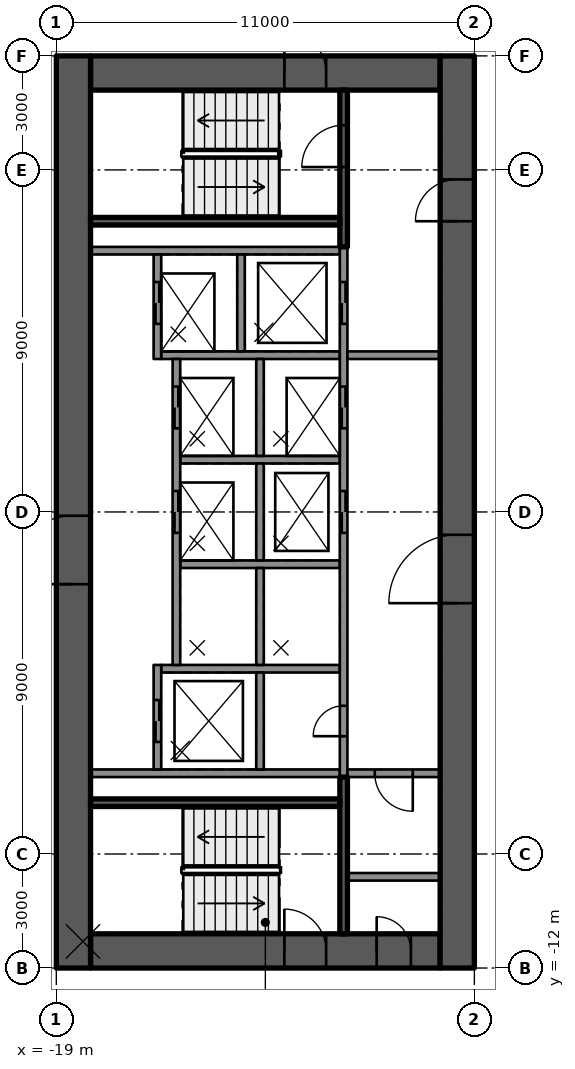
"""IFC4 building model, lengths in metres.
Left out: names, types, materials, properties, quantities, classifications, styles, units other than length and angle.
Written with IfcOpenShell. Run it as: python <this file> out.ifc"""

import sys

from ifc_helpers import new_model, si_unit, direction, frame, frame_2d, origin, place, context, subcontext, project, spatial, rectangle, extrude, element, fill, save


model = new_model("IFC4")
c1 = context("Model", 3, precision=1e-05, world=origin(), true_north=direction((0.0, 1.0)))
c2 = subcontext(c1, "Body", "Model", "MODEL_VIEW")
j1 = project(units=[si_unit("LENGTHUNIT", "METRE"), si_unit("PLANEANGLEUNIT", "RADIAN")], contexts=[c1])
p1 = place(None, origin())
s1 = spatial("IfcSite", under=j1, at=p1, CompositionType="ELEMENT")
p2 = place(p1, origin())
s2 = spatial("IfcBuilding", under=s1, at=p2, CompositionType="ELEMENT")
p3 = place(p2, frame((0.0, 0.0, 116.2)))
s3 = spatial("IfcBuildingStorey", under=s2, at=p3, CompositionType="ELEMENT", Elevation=116.2)
p4 = place(p3, frame((-18.1, 11.55, 0.0), z_axis=(0.0, 0.0, 1.0), x_axis=(1.0, 0.0, 0.0)))
e1 = element("IfcWall", 1, at=p4, inside=s3, PredefinedType="SHEAR", context=c2, shape_type="SweptSolid", body=[
    extrude(rectangle(XDim=9.2, YDim=0.9, at=frame_2d((4.6, 0.0))), origin(), (0.0, 0.0, 1.0), 3.5),
])
p5 = place(p4, frame((5.1, 0.0, 0.0)))
e2 = element("IfcOpeningElement", 2, at=p5, cuts=e1, PredefinedType="OPENING", context=c2, shape_type="SweptSolid", body=[
    extrude(rectangle(XDim=1.1, YDim=2.1, at=frame_2d((0.55, 1.05))), frame((0.0, 0.46, 0.0), z_axis=(0.0, -1.0, 0.0), x_axis=(1.0, 0.0, 0.0)), (0.0, 0.0, 1.0), 0.92),
])
p6 = place(p3, frame((-18.1, -11.55, 0.0), z_axis=(0.0, 0.0, 1.0), x_axis=(1.0, 0.0, 0.0)))
e3 = element("IfcWall", 3, at=p6, inside=s3, PredefinedType="SHEAR", context=c2, shape_type="SweptSolid", body=[
    extrude(rectangle(XDim=9.2, YDim=0.9, at=frame_2d((4.6, 0.0))), origin(), (0.0, 0.0, 1.0), 3.5),
])
p7 = place(p6, frame((5.1, 0.0, 0.0)))
e4 = element("IfcOpeningElement", 4, at=p7, cuts=e3, PredefinedType="OPENING", context=c2, shape_type="SweptSolid", body=[
    extrude(rectangle(XDim=1.1, YDim=2.1, at=frame_2d((0.55, 1.05))), frame((0.0, 0.46, 0.0), z_axis=(0.0, -1.0, 0.0), x_axis=(1.0, 0.0, 0.0)), (0.0, 0.0, 1.0), 0.92),
])
p8 = place(p6, frame((7.53, 0.0, 0.0)))
e5 = element("IfcOpeningElement", 5, at=p8, cuts=e3, PredefinedType="OPENING", context=c2, shape_type="SweptSolid", body=[
    extrude(rectangle(XDim=0.9, YDim=2.1, at=frame_2d((0.45, 1.05))), frame((0.0, 0.46, 0.0), z_axis=(0.0, -1.0, 0.0), x_axis=(1.0, 0.0, 0.0)), (0.0, 0.0, 1.0), 0.92),
])
p9 = place(p3, frame((-18.55, -12.0, 0.0), z_axis=(0.0, 0.0, 1.0), x_axis=(0.0, 1.0, 0.0)))
e6 = element("IfcWall", 6, at=p9, inside=s3, PredefinedType="SHEAR", context=c2, shape_type="SweptSolid", body=[
    extrude(rectangle(XDim=24.0, YDim=0.9, at=frame_2d((12.0, 0.0))), origin(), (0.0, 0.0, 1.0), 3.5),
])
p10 = place(p9, frame((10.1, 0.0, 0.0)))
e7 = element("IfcOpeningElement", 7, at=p10, cuts=e6, PredefinedType="OPENING", context=c2, shape_type="SweptSolid", body=[
    extrude(rectangle(XDim=1.8, YDim=2.1, at=frame_2d((0.9, 1.05))), frame((0.0, 0.46, 0.0), z_axis=(0.0, -1.0, 0.0), x_axis=(1.0, 0.0, 0.0)), (0.0, 0.0, 1.0), 0.92),
])
p11 = place(p3, frame((-8.45, -12.0, 0.0), z_axis=(0.0, 0.0, 1.0), x_axis=(0.0, 1.0, 0.0)))
e8 = element("IfcWall", 8, at=p11, inside=s3, PredefinedType="SHEAR", context=c2, shape_type="SweptSolid", body=[
    extrude(rectangle(XDim=24.0, YDim=0.9, at=frame_2d((12.0, 0.0))), origin(), (0.0, 0.0, 1.0), 3.5),
])
p12 = place(p11, frame((9.6, 0.0, 0.0)))
e9 = element("IfcOpeningElement", 9, at=p12, cuts=e8, PredefinedType="OPENING", context=c2, shape_type="SweptSolid", body=[
    extrude(rectangle(XDim=1.8, YDim=2.1, at=frame_2d((0.9, 1.05))), frame((0.0, 0.46, 0.0), z_axis=(0.0, -1.0, 0.0), x_axis=(1.0, 0.0, 0.0)), (0.0, 0.0, 1.0), 0.92),
])
p13 = place(p11, frame((19.65, 0.0, 0.0)))
e10 = element("IfcOpeningElement", 10, at=p13, cuts=e8, PredefinedType="OPENING", context=c2, shape_type="SweptSolid", body=[
    extrude(rectangle(XDim=1.1, YDim=2.1, at=frame_2d((0.55, 1.05))), frame((0.0, 0.46, 0.0), z_axis=(0.0, -1.0, 0.0), x_axis=(1.0, 0.0, 0.0)), (0.0, 0.0, 1.0), 0.92),
])
for number, where, z_axis, x_axis in (
    (11, (-11.54, 6.875, 0.0), (0.0, 0.0, 1.0), (-1.0, 0.0, 0.0)),
    (12, (-11.54, -6.875, 0.0), (0.0, 0.0, 1.0), (-1.0, 0.0, 0.0)),
):
    element("IfcWall", number, at=place(p3, frame(where, z_axis=z_axis, x_axis=x_axis)), inside=s3, PredefinedType="SOLIDWALL", context=c2, shape_type="SweptSolid", body=[
        extrude(rectangle(XDim=6.56, YDim=0.2, at=frame_2d((3.28, 0.0))), origin(), (0.0, 0.0, 1.0), 3.09),
    ])
p14 = place(p3, frame((-11.54, -4.125, 0.0), z_axis=(0.0, 0.0, 1.0), x_axis=(-1.0, 0.0, 0.0)))
e13 = element("IfcWall", 13, at=p14, inside=s3, PredefinedType="SOLIDWALL", context=c2, shape_type="SweptSolid", body=[
    extrude(rectangle(XDim=4.7, YDim=0.2, at=frame_2d((2.35, 0.0))), origin(), (0.0, 0.0, 1.0), 3.09),
])
for number, where, z_axis, x_axis in (
    (14, (-11.54, -1.375, 0.0), (0.0, 0.0, 1.0), (-1.0, 0.0, 0.0)),
    (15, (-11.54, 1.375, 0.0), (0.0, 0.0, 1.0), (-1.0, 0.0, 0.0)),
):
    element("IfcWall", number, at=place(p3, frame(where, z_axis=z_axis, x_axis=x_axis)), inside=s3, PredefinedType="SOLIDWALL", context=c2, shape_type="SweptSolid", body=[
        extrude(rectangle(XDim=4.2, YDim=0.2, at=frame_2d((2.1, 0.0))), origin(), (0.0, 0.0, 1.0), 3.09),
    ])
p15 = place(p3, frame((-11.54, 4.125, 0.0), z_axis=(0.0, 0.0, 1.0), x_axis=(-1.0, 0.0, 0.0)))
e16 = element("IfcWall", 16, at=p15, inside=s3, PredefinedType="SOLIDWALL", context=c2, shape_type="SweptSolid", body=[
    extrude(rectangle(XDim=4.7, YDim=0.2, at=frame_2d((2.35, 0.0))), origin(), (0.0, 0.0, 1.0), 3.09),
])
p16 = place(p3, frame((-11.44, -6.975, 0.0), z_axis=(0.0, 0.0, 1.0), x_axis=(0.0, 1.0, 0.0)))
e17 = element("IfcWall", 17, at=p16, inside=s3, PredefinedType="SOLIDWALL", context=c2, shape_type="SweptSolid", body=[
    extrude(rectangle(XDim=13.95, YDim=0.2, at=frame_2d((6.975, 0.0))), origin(), (0.0, 0.0, 1.0), 3.09),
])
p17 = place(p16, frame((6.425, 0.0, 0.0)))
e18 = element("IfcOpeningElement", 18, at=p17, cuts=e17, PredefinedType="OPENING", context=c2, shape_type="SweptSolid", body=[
    extrude(rectangle(XDim=1.1, YDim=2.1, at=frame_2d((0.55, 1.05))), frame((0.0, 0.11, 0.0), z_axis=(0.0, -1.0, 0.0), x_axis=(1.0, 0.0, 0.0)), (0.0, 0.0, 1.0), 0.22),
])
p18 = place(p16, frame((9.175, 0.0, 0.0)))
e19 = element("IfcOpeningElement", 19, at=p18, cuts=e17, PredefinedType="OPENING", context=c2, shape_type="SweptSolid", body=[
    extrude(rectangle(XDim=1.1, YDim=2.1, at=frame_2d((0.55, 1.05))), frame((0.0, 0.11, 0.0), z_axis=(0.0, -1.0, 0.0), x_axis=(1.0, 0.0, 0.0)), (0.0, 0.0, 1.0), 0.22),
])
p19 = place(p16, frame((11.925, 0.0, 0.0)))
e20 = element("IfcOpeningElement", 20, at=p19, cuts=e17, PredefinedType="OPENING", context=c2, shape_type="SweptSolid", body=[
    extrude(rectangle(XDim=1.1, YDim=2.1, at=frame_2d((0.55, 1.05))), frame((0.0, 0.11, 0.0), z_axis=(0.0, -1.0, 0.0), x_axis=(1.0, 0.0, 0.0)), (0.0, 0.0, 1.0), 0.22),
])
p20 = place(p16, frame((1.075, 0.0, 0.0)))
e21 = element("IfcOpeningElement", 21, at=p20, cuts=e17, PredefinedType="OPENING", context=c2, shape_type="SweptSolid", body=[
    extrude(rectangle(XDim=0.8, YDim=2.1, at=frame_2d((0.4, 1.05))), frame((0.0, 0.11, 0.0), z_axis=(0.0, -1.0, 0.0), x_axis=(1.0, 0.0, 0.0)), (0.0, 0.0, 1.0), 0.22),
])
for number, where, z_axis, x_axis in (
    (22, (-13.64, -6.775, 0.0), (0.0, 0.0, 1.0), (0.0, 1.0, 0.0)),
    (23, (-13.64, -4.025, 0.0), (0.0, 0.0, 1.0), (0.0, 1.0, 0.0)),
    (24, (-13.64, -1.275, 0.0), (0.0, 0.0, 1.0), (0.0, 1.0, 0.0)),
    (25, (-13.64, 1.475, 0.0), (0.0, 0.0, 1.0), (0.0, 1.0, 0.0)),
    (26, (-14.14, 4.225, 0.0), (0.0, 0.0, 1.0), (0.0, 1.0, 0.0)),
):
    element("IfcWall", number, at=place(p3, frame(where, z_axis=z_axis, x_axis=x_axis)), inside=s3, PredefinedType="SOLIDWALL", context=c2, shape_type="SweptSolid", body=[
        extrude(rectangle(XDim=2.55, YDim=0.2, at=frame_2d((1.275, 0.0))), origin(), (0.0, 0.0, 1.0), 3.09),
    ])
p21 = place(p3, frame((-16.34, -6.775, 0.0), z_axis=(0.0, 0.0, 1.0), x_axis=(0.0, 1.0, 0.0)))
e27 = element("IfcWall", 27, at=p21, inside=s3, PredefinedType="SOLIDWALL", context=c2, shape_type="SweptSolid", body=[
    extrude(rectangle(XDim=2.75, YDim=0.2, at=frame_2d((1.375, 0.0))), origin(), (0.0, 0.0, 1.0), 3.09),
])
p22 = place(p21, frame((0.725, 0.0, 0.0)))
e28 = element("IfcOpeningElement", 28, at=p22, cuts=e27, PredefinedType="OPENING", context=c2, shape_type="SweptSolid", body=[
    extrude(rectangle(XDim=1.1, YDim=2.1, at=frame_2d((0.55, 1.05))), frame((0.0, 0.11, 0.0), z_axis=(0.0, -1.0, 0.0), x_axis=(1.0, 0.0, 0.0)), (0.0, 0.0, 1.0), 0.22),
])
p23 = place(p3, frame((-15.84, -4.025, 0.0), z_axis=(0.0, 0.0, 1.0), x_axis=(0.0, 1.0, 0.0)))
e29 = element("IfcWall", 29, at=p23, inside=s3, PredefinedType="SOLIDWALL", context=c2, shape_type="SweptSolid", body=[
    extrude(rectangle(XDim=8.05, YDim=0.2, at=frame_2d((4.025, 0.0))), origin(), (0.0, 0.0, 1.0), 3.09),
])
p24 = place(p23, frame((3.475, 0.0, 0.0)))
e30 = element("IfcOpeningElement", 30, at=p24, cuts=e29, PredefinedType="OPENING", context=c2, shape_type="SweptSolid", body=[
    extrude(rectangle(XDim=1.1, YDim=2.1, at=frame_2d((0.55, 1.05))), frame((0.0, 0.11, 0.0), z_axis=(0.0, -1.0, 0.0), x_axis=(1.0, 0.0, 0.0)), (0.0, 0.0, 1.0), 0.22),
])
p25 = place(p23, frame((6.225, 0.0, 0.0)))
e31 = element("IfcOpeningElement", 31, at=p25, cuts=e29, PredefinedType="OPENING", context=c2, shape_type="SweptSolid", body=[
    extrude(rectangle(XDim=1.1, YDim=2.1, at=frame_2d((0.55, 1.05))), frame((0.0, 0.11, 0.0), z_axis=(0.0, -1.0, 0.0), x_axis=(1.0, 0.0, 0.0)), (0.0, 0.0, 1.0), 0.22),
])
p26 = place(p3, frame((-16.34, 4.025, 0.0), z_axis=(0.0, 0.0, 1.0), x_axis=(0.0, 1.0, 0.0)))
e32 = element("IfcWall", 32, at=p26, inside=s3, PredefinedType="SOLIDWALL", context=c2, shape_type="SweptSolid", body=[
    extrude(rectangle(XDim=2.75, YDim=0.2, at=frame_2d((1.375, 0.0))), origin(), (0.0, 0.0, 1.0), 3.09),
])
p27 = place(p26, frame((0.925, 0.0, 0.0)))
e33 = element("IfcOpeningElement", 33, at=p27, cuts=e32, PredefinedType="OPENING", context=c2, shape_type="SweptSolid", body=[
    extrude(rectangle(XDim=1.1, YDim=2.1, at=frame_2d((0.55, 1.05))), frame((0.0, 0.11, 0.0), z_axis=(0.0, -1.0, 0.0), x_axis=(1.0, 0.0, 0.0)), (0.0, 0.0, 1.0), 0.22),
])
p28 = place(p3, frame((-11.44, 6.975, 0.0), z_axis=(0.0, 0.0, 1.0), x_axis=(0.0, 1.0, 0.0)))
e34 = element("IfcWall", 34, at=p28, inside=s3, PredefinedType="SOLIDWALL", context=c2, shape_type="SweptSolid", body=[
    extrude(rectangle(XDim=4.125, YDim=0.2, at=frame_2d((2.062, 0.0))), origin(), (0.0, 0.0, 1.0), 3.09),
])
p29 = place(p28, frame((2.1, 0.0, 0.0)))
e35 = element("IfcOpeningElement", 35, at=p29, cuts=e34, PredefinedType="OPENING", context=c2, shape_type="SweptSolid", body=[
    extrude(rectangle(XDim=1.1, YDim=2.1, at=frame_2d((0.55, 1.05))), frame((0.0, 0.11, 0.0), z_axis=(0.0, -1.0, 0.0), x_axis=(1.0, 0.0, 0.0)), (0.0, 0.0, 1.0), 0.22),
])
p30 = place(p3, frame((-11.54, 7.65, 0.0), z_axis=(0.0, 0.0, 1.0), x_axis=(-1.0, 0.0, 0.0)))
e36 = element("IfcWall", 36, at=p30, inside=s3, PredefinedType="SOLIDWALL", context=c2, shape_type="SweptSolid", body=[
    extrude(rectangle(XDim=6.56, YDim=0.2, at=frame_2d((3.28, 0.0))), origin(), (0.0, 0.0, 1.0), 3.09),
])
p31 = place(p3, frame((-11.44, -11.1, 0.0), z_axis=(0.0, 0.0, 1.0), x_axis=(0.0, 1.0, 0.0)))
e37 = element("IfcWall", 37, at=p31, inside=s3, PredefinedType="SOLIDWALL", context=c2, shape_type="SweptSolid", body=[
    extrude(rectangle(XDim=4.125, YDim=0.2, at=frame_2d((2.062, 0.0))), origin(), (0.0, 0.0, 1.0), 3.09),
])
p32 = place(p3, frame((-11.54, -7.65, 0.0), z_axis=(0.0, 0.0, 1.0), x_axis=(-1.0, 0.0, 0.0)))
e38 = element("IfcWall", 38, at=p32, inside=s3, PredefinedType="SOLIDWALL", context=c2, shape_type="SweptSolid", body=[
    extrude(rectangle(XDim=6.56, YDim=0.2, at=frame_2d((3.28, 0.0))), origin(), (0.0, 0.0, 1.0), 3.09),
])
p33 = place(p3, frame((-8.9, 4.125, 0.0), z_axis=(0.0, 0.0, 1.0), x_axis=(-1.0, 0.0, 0.0)))
e39 = element("IfcWall", 39, at=p33, inside=s3, PredefinedType="PARTITIONING", context=c2, shape_type="SweptSolid", body=[
    extrude(rectangle(XDim=2.44, YDim=0.2, at=frame_2d((1.22, 0.0))), origin(), (0.0, 0.0, 1.0), 3.09),
])
p34 = place(p3, frame((-8.9, -6.875, 0.0), z_axis=(0.0, 0.0, 1.0), x_axis=(-1.0, 0.0, 0.0)))
e40 = element("IfcWall", 40, at=p34, inside=s3, PredefinedType="PARTITIONING", context=c2, shape_type="SweptSolid", body=[
    extrude(rectangle(XDim=2.44, YDim=0.2, at=frame_2d((1.22, 0.0))), origin(), (0.0, 0.0, 1.0), 3.09),
])
p35 = place(p34, frame((0.72, 0.0, 0.0)))
e41 = element("IfcOpeningElement", 41, at=p35, cuts=e40, PredefinedType="OPENING", context=c2, shape_type="SweptSolid", body=[
    extrude(rectangle(XDim=1.0, YDim=2.1, at=frame_2d((0.5, 1.05))), frame((0.0, 0.11, 0.0), z_axis=(0.0, -1.0, 0.0), x_axis=(1.0, 0.0, 0.0)), (0.0, 0.0, 1.0), 0.22),
])
p36 = place(p3, frame((-8.9, -9.6, 0.0), z_axis=(0.0, 0.0, 1.0), x_axis=(-1.0, 0.0, 0.0)))
e42 = element("IfcWall", 42, at=p36, inside=s3, PredefinedType="PARTITIONING", context=c2, shape_type="SweptSolid", body=[
    extrude(rectangle(XDim=2.44, YDim=0.2, at=frame_2d((1.22, 0.0))), origin(), (0.0, 0.0, 1.0), 3.09),
])
p37 = place(p22, origin())
e43 = element("IfcDoor", 43, at=p37, inside=s3, OperationType="DOUBLE_DOOR_SLIDING", PredefinedType="DOOR", context=c2, shape_type="SweptSolid", body=[
    extrude(rectangle(XDim=1.1, YDim=2.1, at=frame_2d((0.55, 1.05))), frame((0.0, 0.025, 0.0), z_axis=(0.0, -1.0, 0.0), x_axis=(1.0, 0.0, 0.0)), (0.0, 0.0, 1.0), 0.05),
])
fill(e28, e43)
p38 = place(p17, origin())
e44 = element("IfcDoor", 44, at=p38, inside=s3, OperationType="DOUBLE_DOOR_SLIDING", PredefinedType="DOOR", context=c2, shape_type="SweptSolid", body=[
    extrude(rectangle(XDim=1.1, YDim=2.1, at=frame_2d((0.55, 1.05))), frame((0.0, 0.025, 0.0), z_axis=(0.0, -1.0, 0.0), x_axis=(1.0, 0.0, 0.0)), (0.0, 0.0, 1.0), 0.05),
])
fill(e18, e44)
p39 = place(p24, origin())
e45 = element("IfcDoor", 45, at=p39, inside=s3, OperationType="DOUBLE_DOOR_SLIDING", PredefinedType="DOOR", context=c2, shape_type="SweptSolid", body=[
    extrude(rectangle(XDim=1.1, YDim=2.1, at=frame_2d((0.55, 1.05))), frame((0.0, 0.025, 0.0), z_axis=(0.0, -1.0, 0.0), x_axis=(1.0, 0.0, 0.0)), (0.0, 0.0, 1.0), 0.05),
])
fill(e30, e45)
p40 = place(p18, origin())
e46 = element("IfcDoor", 46, at=p40, inside=s3, OperationType="DOUBLE_DOOR_SLIDING", PredefinedType="DOOR", context=c2, shape_type="SweptSolid", body=[
    extrude(rectangle(XDim=1.1, YDim=2.1, at=frame_2d((0.55, 1.05))), frame((0.0, 0.025, 0.0), z_axis=(0.0, -1.0, 0.0), x_axis=(1.0, 0.0, 0.0)), (0.0, 0.0, 1.0), 0.05),
])
fill(e19, e46)
p41 = place(p25, origin())
e47 = element("IfcDoor", 47, at=p41, inside=s3, OperationType="DOUBLE_DOOR_SLIDING", PredefinedType="DOOR", context=c2, shape_type="SweptSolid", body=[
    extrude(rectangle(XDim=1.1, YDim=2.1, at=frame_2d((0.55, 1.05))), frame((0.0, 0.025, 0.0), z_axis=(0.0, -1.0, 0.0), x_axis=(1.0, 0.0, 0.0)), (0.0, 0.0, 1.0), 0.05),
])
fill(e31, e47)
p42 = place(p19, origin())
e48 = element("IfcDoor", 48, at=p42, inside=s3, OperationType="DOUBLE_DOOR_SLIDING", PredefinedType="DOOR", context=c2, shape_type="SweptSolid", body=[
    extrude(rectangle(XDim=1.1, YDim=2.1, at=frame_2d((0.55, 1.05))), frame((0.0, 0.025, 0.0), z_axis=(0.0, -1.0, 0.0), x_axis=(1.0, 0.0, 0.0)), (0.0, 0.0, 1.0), 0.05),
])
fill(e20, e48)
p43 = place(p27, origin())
e49 = element("IfcDoor", 49, at=p43, inside=s3, OperationType="DOUBLE_DOOR_SLIDING", PredefinedType="DOOR", context=c2, shape_type="SweptSolid", body=[
    extrude(rectangle(XDim=1.1, YDim=2.1, at=frame_2d((0.55, 1.05))), frame((0.0, 0.025, 0.0), z_axis=(0.0, -1.0, 0.0), x_axis=(1.0, 0.0, 0.0)), (0.0, 0.0, 1.0), 0.05),
])
fill(e33, e49)
p44 = place(p20, origin())
e50 = element("IfcDoor", 50, at=p44, inside=s3, OperationType="SINGLE_SWING_LEFT", PredefinedType="DOOR", context=c2, shape_type="SweptSolid", body=[
    extrude(rectangle(XDim=0.8, YDim=2.1, at=frame_2d((0.4, 1.05))), frame((0.0, 0.025, 0.0), z_axis=(0.0, -1.0, 0.0), x_axis=(1.0, 0.0, 0.0)), (0.0, 0.0, 1.0), 0.05),
])
fill(e21, e50)
p45 = place(p12, origin())
e51 = element("IfcDoor", 51, at=p45, inside=s3, OperationType="SINGLE_SWING_LEFT", PredefinedType="DOOR", context=c2, shape_type="SweptSolid", body=[
    extrude(rectangle(XDim=1.8, YDim=2.1, at=frame_2d((0.9, 1.05))), frame((0.0, 0.025, 0.0), z_axis=(0.0, -1.0, 0.0), x_axis=(1.0, 0.0, 0.0)), (0.0, 0.0, 1.0), 0.05),
])
fill(e9, e51)
p46 = place(p10, origin())
e52 = element("IfcDoor", 52, at=p46, inside=s3, OperationType="SINGLE_SWING_LEFT", PredefinedType="DOOR", context=c2, shape_type="SweptSolid", body=[
    extrude(rectangle(XDim=1.8, YDim=2.1, at=frame_2d((0.9, 1.05))), frame((0.0, 0.025, 0.0), z_axis=(0.0, -1.0, 0.0), x_axis=(1.0, 0.0, 0.0)), (0.0, 0.0, 1.0), 0.05),
])
fill(e7, e52)
p47 = place(p13, origin())
e53 = element("IfcDoor", 53, at=p47, inside=s3, OperationType="SINGLE_SWING_RIGHT", PredefinedType="DOOR", context=c2, shape_type="SweptSolid", body=[
    extrude(rectangle(XDim=1.1, YDim=2.1, at=frame_2d((0.55, 1.05))), frame((0.0, 0.025, 0.0), z_axis=(0.0, -1.0, 0.0), x_axis=(1.0, 0.0, 0.0)), (0.0, 0.0, 1.0), 0.05),
])
fill(e10, e53)
p48 = place(p5, origin())
e54 = element("IfcDoor", 54, at=p48, inside=s3, OperationType="SINGLE_SWING_RIGHT", PredefinedType="DOOR", context=c2, shape_type="SweptSolid", body=[
    extrude(rectangle(XDim=1.1, YDim=2.1, at=frame_2d((0.55, 1.05))), frame((0.0, 0.025, 0.0), z_axis=(0.0, -1.0, 0.0), x_axis=(1.0, 0.0, 0.0)), (0.0, 0.0, 1.0), 0.05),
])
fill(e2, e54)
p49 = place(p7, origin())
e55 = element("IfcDoor", 55, at=p49, inside=s3, OperationType="SINGLE_SWING_RIGHT", PredefinedType="DOOR", context=c2, shape_type="SweptSolid", body=[
    extrude(rectangle(XDim=1.1, YDim=2.1, at=frame_2d((0.55, 1.05))), frame((0.0, 0.025, 0.0), z_axis=(0.0, -1.0, 0.0), x_axis=(1.0, 0.0, 0.0)), (0.0, 0.0, 1.0), 0.05),
])
fill(e4, e55)
p50 = place(p29, origin())
e56 = element("IfcDoor", 56, at=p50, inside=s3, OperationType="SINGLE_SWING_RIGHT", PredefinedType="DOOR", context=c2, shape_type="SweptSolid", body=[
    extrude(rectangle(XDim=1.1, YDim=2.1, at=frame_2d((0.55, 1.05))), frame((0.0, 0.025, 0.0), z_axis=(0.0, -1.0, 0.0), x_axis=(1.0, 0.0, 0.0)), (0.0, 0.0, 1.0), 0.05),
])
fill(e35, e56)
p51 = place(p8, origin())
e57 = element("IfcDoor", 57, at=p51, inside=s3, OperationType="SINGLE_SWING_RIGHT", PredefinedType="DOOR", context=c2, shape_type="SweptSolid", body=[
    extrude(rectangle(XDim=0.9, YDim=2.1, at=frame_2d((0.45, 1.05))), frame((0.0, 0.025, 0.0), z_axis=(0.0, -1.0, 0.0), x_axis=(1.0, 0.0, 0.0)), (0.0, 0.0, 1.0), 0.05),
])
fill(e5, e57)
p52 = place(p35, origin())
e58 = element("IfcDoor", 58, at=p52, inside=s3, OperationType="SINGLE_SWING_RIGHT", PredefinedType="DOOR", context=c2, shape_type="SweptSolid", body=[
    extrude(rectangle(XDim=1.0, YDim=2.1, at=frame_2d((0.5, 1.05))), frame((0.0, 0.025, 0.0), z_axis=(0.0, -1.0, 0.0), x_axis=(1.0, 0.0, 0.0)), (0.0, 0.0, 1.0), 0.05),
])
fill(e41, e58)
save(model, sys.argv[1])
